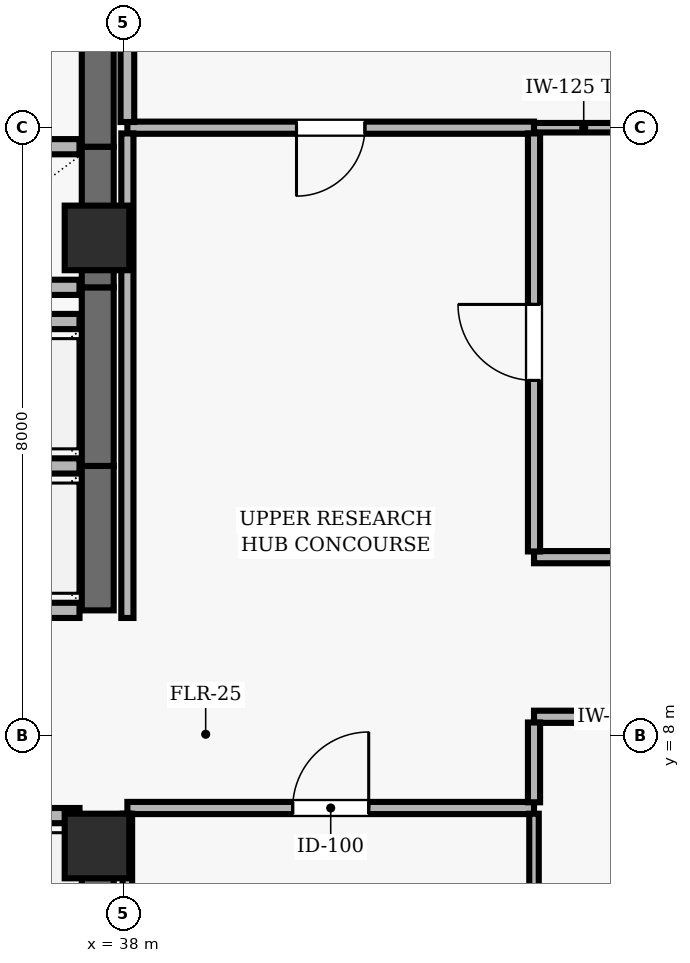
"""IFC4 building model, lengths in metres.
Left out: names, types, materials, properties, quantities, classifications, styles, units other than length and angle.
Written with IfcOpenShell. Run it as: python <this file> out.ifc"""

import sys

from ifc_helpers import new_model, si_unit, direction, frame, frame_2d, origin, origin_2d, place, context, subcontext, project, spatial, rectangle, extrude, element, fill, save


model = new_model("IFC4")
c1 = context("Model", 3, precision=1e-05, world=origin(), true_north=direction((0.0, 1.0)))
c2 = subcontext(c1, "Body", "Model", "MODEL_VIEW")
j1 = project(units=[si_unit("LENGTHUNIT", "METRE"), si_unit("PLANEANGLEUNIT", "RADIAN")], contexts=[c1])
p1 = place(None, origin())
s1 = spatial("IfcSite", under=j1, at=p1, CompositionType="ELEMENT")
p2 = place(p1, origin())
s2 = spatial("IfcBuilding", under=s1, at=p2, CompositionType="ELEMENT")
p3 = place(p2, frame((0.0, 0.0, 248.2)))
s3 = spatial("IfcBuildingStorey", under=s2, at=p3, CompositionType="ELEMENT", Elevation=248.2)
for number, where, z_axis, x_axis in (
    (1, (37.65, 6.55, 0.0), (0.0, 0.0, 1.0), (1.0, 0.0, 0.0)),
    (2, (37.65, 14.55, 0.0), (0.0, 0.0, 1.0), (1.0, 0.0, 0.0)),
):
    element("IfcColumn", number, at=place(p3, frame(where, z_axis=z_axis, x_axis=x_axis)), inside=s3, PredefinedType="COLUMN", context=c2, shape_type="SweptSolid", body=[
        extrude(rectangle(XDim=0.85, YDim=0.85, at=origin_2d()), origin(), (0.0, 0.0, 1.0), 3.9),
    ])
p4 = place(p3, frame((37.66, 4.7, 0.0), z_axis=(0.0, 0.0, 1.0), x_axis=(0.0, 1.0, 0.0)))
e3 = element("IfcWall", 3, at=p4, inside=s3, PredefinedType="SHEAR", context=c2, shape_type="SweptSolid", body=[
    extrude(rectangle(XDim=2.25, YDim=0.42, at=frame_2d((1.125, 0.0))), origin(), (0.0, 0.0, 1.0), 3.69),
])
p5 = place(p3, frame((37.42, 6.95, 0.0), z_axis=(0.0, 0.0, 1.0), x_axis=(-1.0, 0.0, 0.0)))
e4 = element("IfcWall", 4, at=p5, inside=s3, PredefinedType="SOLIDWALL", context=c2, shape_type="SweptSolid", body=[
    extrude(rectangle(XDim=2.14, YDim=0.2, at=frame_2d((1.07, 0.0))), origin(), (0.0, 0.0, 1.0), 3.69),
])
p6 = place(p3, frame((37.66, 9.65, 0.0), z_axis=(0.0, 0.0, 1.0), x_axis=(0.0, 1.0, 0.0)))
e5 = element("IfcWall", 5, at=p6, inside=s3, PredefinedType="SHEAR", context=c2, shape_type="SweptSolid", body=[
    extrude(rectangle(XDim=1.9, YDim=0.42, at=frame_2d((0.95, 0.0))), origin(), (0.0, 0.0, 1.0), 3.69),
])
for number, where, z_axis, x_axis in (
    (6, (35.28, 9.65, 0.0), (0.0, 0.0, 1.0), (1.0, 0.0, 0.0)),
    (7, (37.42, 11.55, 0.0), (0.0, 0.0, 1.0), (-1.0, 0.0, 0.0)),
):
    element("IfcWall", number, at=place(p3, frame(where, z_axis=z_axis, x_axis=x_axis)), inside=s3, PredefinedType="SOLIDWALL", context=c2, shape_type="SweptSolid", body=[
        extrude(rectangle(XDim=2.14, YDim=0.2, at=frame_2d((1.07, 0.0))), origin(), (0.0, 0.0, 1.0), 3.69),
    ])
p7 = place(p3, frame((37.66, 11.55, 0.0), z_axis=(0.0, 0.0, 1.0), x_axis=(0.0, 1.0, 0.0)))
e8 = element("IfcWall", 8, at=p7, inside=s3, PredefinedType="SHEAR", context=c2, shape_type="SweptSolid", body=[
    extrude(rectangle(XDim=2.35, YDim=0.42, at=frame_2d((1.175, 0.0))), origin(), (0.0, 0.0, 1.0), 3.69),
])
p8 = place(p3, frame((37.42, 13.45, 0.0), z_axis=(0.0, 0.0, 1.0), x_axis=(-1.0, 0.0, 0.0)))
e9 = element("IfcWall", 9, at=p8, inside=s3, PredefinedType="SOLIDWALL", context=c2, shape_type="SweptSolid", body=[
    extrude(rectangle(XDim=2.14, YDim=0.2, at=frame_2d((1.07, 0.0))), origin(), (0.0, 0.0, 1.0), 3.69),
])
p9 = place(p3, frame((37.66, 13.9, 0.0), z_axis=(0.0, 0.0, 1.0), x_axis=(0.0, 1.0, 0.0)))
e10 = element("IfcWall", 10, at=p9, inside=s3, PredefinedType="SHEAR", context=c2, shape_type="SweptSolid", body=[
    extrude(rectangle(XDim=1.85, YDim=0.42, at=frame_2d((0.925, 0.0))), origin(), (0.0, 0.0, 1.0), 3.69),
])
for number, where, z_axis, x_axis in (
    (11, (35.28, 13.9, 0.0), (0.0, 0.0, 1.0), (1.0, 0.0, 0.0)),
    (12, (37.42, 15.75, 0.0), (0.0, 0.0, 1.0), (-1.0, 0.0, 0.0)),
):
    element("IfcWall", number, at=place(p3, frame(where, z_axis=z_axis, x_axis=x_axis)), inside=s3, PredefinedType="SOLIDWALL", context=c2, shape_type="SweptSolid", body=[
        extrude(rectangle(XDim=2.14, YDim=0.2, at=frame_2d((1.07, 0.0))), origin(), (0.0, 0.0, 1.0), 3.69),
    ])
p10 = place(p3, frame((37.66, 15.75, 0.0), z_axis=(0.0, 0.0, 1.0), x_axis=(0.0, 1.0, 0.0)))
e13 = element("IfcWall", 13, at=p10, inside=s3, PredefinedType="SHEAR", context=c2, shape_type="SweptSolid", body=[
    extrude(rectangle(XDim=1.85, YDim=0.42, at=frame_2d((0.925, 0.0))), origin(), (0.0, 0.0, 1.0), 3.69),
])
p11 = place(p3, frame((38.05, 7.05, 0.0), z_axis=(0.0, 0.0, 1.0), x_axis=(1.0, 0.0, 0.0)))
e14 = element("IfcWall", 14, at=p11, inside=s3, PredefinedType="PARTITIONING", context=c2, shape_type="SweptSolid", body=[
    extrude(rectangle(XDim=5.35, YDim=0.16, at=frame_2d((2.675, 0.0))), origin(), (0.0, 0.0, 1.0), 3.69),
])
p12 = place(p11, frame((2.175, 0.0, 0.0)))
e15 = element("IfcOpeningElement", 15, at=p12, cuts=e14, PredefinedType="OPENING", context=c2, shape_type="SweptSolid", body=[
    extrude(rectangle(XDim=1.0, YDim=2.1, at=frame_2d((0.5, 1.05))), frame((0.0, 0.09, 0.0), z_axis=(0.0, -1.0, 0.0), x_axis=(1.0, 0.0, 0.0)), (0.0, 0.0, 1.0), 0.18),
])
p13 = place(p3, frame((43.4, 8.25, 0.0), z_axis=(0.0, 0.0, 1.0), x_axis=(1.0, 0.0, 0.0)))
e16 = element("IfcWall", 16, at=p13, inside=s3, PredefinedType="PARTITIONING", context=c2, shape_type="SweptSolid", body=[
    extrude(rectangle(XDim=5.41, YDim=0.16, at=frame_2d((2.705, 0.0))), origin(), (0.0, 0.0, 1.0), 3.221),
])
p14 = place(p13, frame((3.655, 0.0, 0.0)))
e17 = element("IfcOpeningElement", 17, at=p14, cuts=e16, PredefinedType="OPENING", context=c2, shape_type="SweptSolid", body=[
    extrude(rectangle(XDim=0.9, YDim=2.1, at=frame_2d((0.45, 1.05))), frame((0.0, 0.09, 0.0), z_axis=(0.0, -1.0, 0.0), x_axis=(1.0, 0.0, 0.0)), (0.0, 0.0, 1.0), 0.18),
])
p15 = place(p3, frame((43.4, 16.0, 0.0), z_axis=(0.0, 0.0, 1.0), x_axis=(-1.0, 0.0, 0.0)))
e18 = element("IfcWall", 18, at=p15, inside=s3, PredefinedType="PARTITIONING", context=c2, shape_type="SweptSolid", body=[
    extrude(rectangle(XDim=5.35, YDim=0.16, at=frame_2d((2.675, 0.0))), origin(), (0.0, 0.0, 1.0), 3.39),
])
p16 = place(p15, frame((2.225, 0.0, 0.0)))
e19 = element("IfcOpeningElement", 19, at=p16, cuts=e18, PredefinedType="OPENING", context=c2, shape_type="SweptSolid", body=[
    extrude(rectangle(XDim=0.9, YDim=2.1, at=frame_2d((0.45, 1.05))), frame((0.0, 0.09, 0.0), z_axis=(0.0, -1.0, 0.0), x_axis=(1.0, 0.0, 0.0)), (0.0, 0.0, 1.0), 0.18),
])
p17 = place(p3, frame((43.4, 16.0, 0.0), z_axis=(0.0, 0.0, 1.0), x_axis=(1.0, 0.0, 0.0)))
e20 = element("IfcWall", 20, at=p17, inside=s3, PredefinedType="PARTITIONING", context=c2, shape_type="SweptSolid", body=[
    extrude(rectangle(XDim=1.308, YDim=0.125, at=frame_2d((0.654, 0.0))), origin(), (0.0, 0.0, 1.0), 3.39),
])
p18 = place(p3, frame((48.81, 10.35, 0.0), z_axis=(0.0, 0.0, 1.0), x_axis=(-1.0, 0.0, 0.0)))
e21 = element("IfcWall", 21, at=p18, inside=s3, PredefinedType="PARTITIONING", context=c2, shape_type="SweptSolid", body=[
    extrude(rectangle(XDim=5.41, YDim=0.16, at=frame_2d((2.705, 0.0))), origin(), (0.0, 0.0, 1.0), 3.372),
])
p19 = place(p3, frame((38.05, 6.975, 0.0), z_axis=(0.0, 0.0, 1.0), x_axis=(0.0, -1.0, 0.0)))
e22 = element("IfcWall", 22, at=p19, inside=s3, PredefinedType="PARTITIONING", context=c2, shape_type="SweptSolid", body=[
    extrude(rectangle(XDim=6.842, YDim=0.125, at=frame_2d((3.421, 0.0))), origin(), (0.0, 0.0, 1.0), 3.221),
])
p20 = place(p3, frame((38.05, 15.925, 0.0), z_axis=(0.0, 0.0, 1.0), x_axis=(0.0, -1.0, 0.0)))
e23 = element("IfcWall", 23, at=p20, inside=s3, PredefinedType="PARTITIONING", context=c2, shape_type="SweptSolid", body=[
    extrude(rectangle(XDim=6.375, YDim=0.16, at=frame_2d((3.188, 0.0))), origin(), (0.0, 0.0, 1.0), 3.221),
])
p21 = place(p3, frame((38.05, 23.85, 0.0), z_axis=(0.0, 0.0, 1.0), x_axis=(0.0, -1.0, 0.0)))
e24 = element("IfcWall", 24, at=p21, inside=s3, PredefinedType="PARTITIONING", context=c2, shape_type="SweptSolid", body=[
    extrude(rectangle(XDim=7.775, YDim=0.18, at=frame_2d((3.888, 0.0))), origin(), (0.0, 0.0, 1.0), 3.221),
])
p22 = place(p3, frame((43.4, 0.133, 0.0), z_axis=(0.0, 0.0, 1.0), x_axis=(0.0, 1.0, 0.0)))
e25 = element("IfcWall", 25, at=p22, inside=s3, PredefinedType="PARTITIONING", context=c2, shape_type="SweptSolid", body=[
    extrude(rectangle(XDim=6.842, YDim=0.125, at=frame_2d((3.421, 0.0))), origin(), (0.0, 0.0, 1.0), 3.69),
])
p23 = place(p3, frame((43.4, 7.125, 0.0), z_axis=(0.0, 0.0, 1.0), x_axis=(0.0, 1.0, 0.0)))
e26 = element("IfcWall", 26, at=p23, inside=s3, PredefinedType="PARTITIONING", context=c2, shape_type="SweptSolid", body=[
    extrude(rectangle(XDim=1.05, YDim=0.16, at=frame_2d((0.525, 0.0))), origin(), (0.0, 0.0, 1.0), 3.69),
])
p24 = place(p3, frame((43.4, 10.425, 0.0), z_axis=(0.0, 0.0, 1.0), x_axis=(0.0, 1.0, 0.0)))
e27 = element("IfcWall", 27, at=p24, inside=s3, PredefinedType="PARTITIONING", context=c2, shape_type="SweptSolid", body=[
    extrude(rectangle(XDim=5.5, YDim=0.16, at=frame_2d((2.75, 0.0))), origin(), (0.0, 0.0, 1.0), 3.69),
])
p25 = place(p24, frame((2.25, 0.0, 0.0)))
e28 = element("IfcOpeningElement", 28, at=p25, cuts=e27, PredefinedType="OPENING", context=c2, shape_type="SweptSolid", body=[
    extrude(rectangle(XDim=1.0, YDim=2.1, at=frame_2d((0.5, 1.05))), frame((0.0, 0.09, 0.0), z_axis=(0.0, -1.0, 0.0), x_axis=(1.0, 0.0, 0.0)), (0.0, 0.0, 1.0), 0.18),
])
p26 = place(p12, origin())
e29 = element("IfcDoor", 29, at=p26, inside=s3, OperationType="SINGLE_SWING_RIGHT", PredefinedType="DOOR", context=c2, shape_type="SweptSolid", body=[
    extrude(rectangle(XDim=1.0, YDim=2.1, at=frame_2d((0.5, 1.05))), frame((0.0, 0.025, 0.0), z_axis=(0.0, -1.0, 0.0), x_axis=(1.0, 0.0, 0.0)), (0.0, 0.0, 1.0), 0.05),
])
fill(e15, e29)
p27 = place(p25, origin())
e30 = element("IfcDoor", 30, at=p27, inside=s3, OperationType="SINGLE_SWING_RIGHT", PredefinedType="DOOR", context=c2, shape_type="SweptSolid", body=[
    extrude(rectangle(XDim=1.0, YDim=2.1, at=frame_2d((0.5, 1.05))), frame((0.0, 0.025, 0.0), z_axis=(0.0, -1.0, 0.0), x_axis=(1.0, 0.0, 0.0)), (0.0, 0.0, 1.0), 0.05),
])
fill(e28, e30)
p28 = place(p16, origin())
e31 = element("IfcDoor", 31, at=p28, inside=s3, OperationType="SINGLE_SWING_RIGHT", PredefinedType="DOOR", context=c2, shape_type="SweptSolid", body=[
    extrude(rectangle(XDim=0.9, YDim=2.1, at=frame_2d((0.45, 1.05))), frame((0.0, 0.025, 0.0), z_axis=(0.0, -1.0, 0.0), x_axis=(1.0, 0.0, 0.0)), (0.0, 0.0, 1.0), 0.05),
])
fill(e19, e31)
save(model, sys.argv[1])
